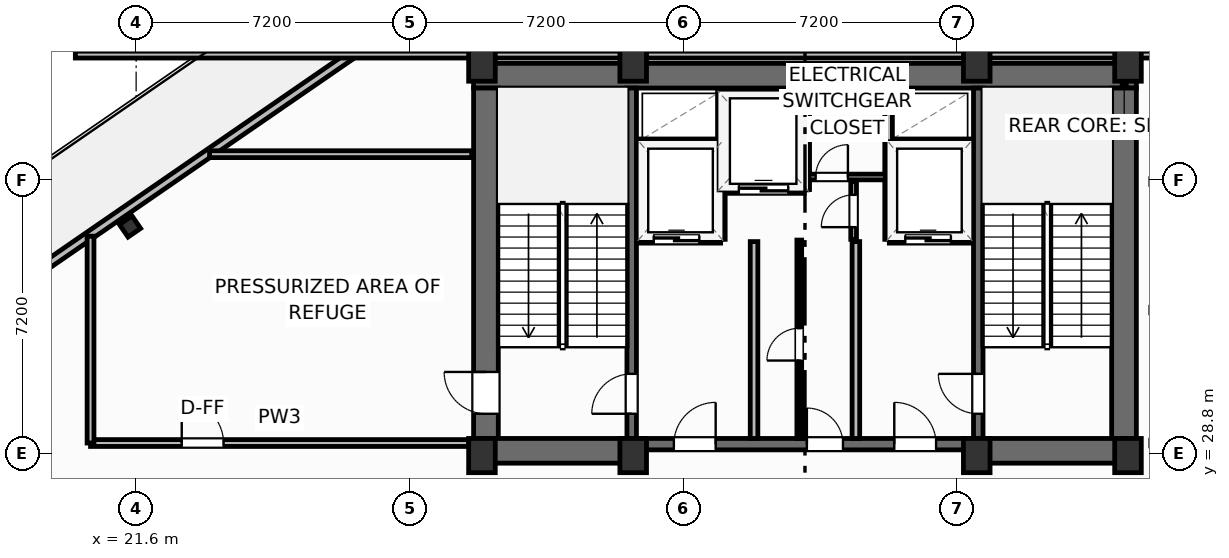
"""IFC4 building model, lengths in metres.
Left out: names, types, materials, properties, quantities, classifications, styles, units other than length and angle.
Written with IfcOpenShell. Run it as: python <this file> out.ifc"""

import sys

from ifc_helpers import new_model, si_unit, direction, frame, frame_2d, origin, origin_2d, place, context, subcontext, project, spatial, rectangle, i_section, extrude, element, fill, save


model = new_model("IFC4")
c1 = context("Model", 3, precision=1e-05, world=origin(), true_north=direction((0.0, 1.0)))
c2 = subcontext(c1, "Body", "Model", "MODEL_VIEW")
j1 = project(units=[si_unit("LENGTHUNIT", "METRE"), si_unit("PLANEANGLEUNIT", "RADIAN")], contexts=[c1])
p1 = place(None, origin())
s1 = spatial("IfcSite", under=j1, at=p1, CompositionType="ELEMENT")
p2 = place(p1, origin())
s2 = spatial("IfcBuilding", under=s1, at=p2, CompositionType="ELEMENT")
p3 = place(p2, frame((0.0, 0.0, 253.4)))
s3 = spatial("IfcBuildingStorey", under=s2, at=p3, CompositionType="ELEMENT", Elevation=253.4)
for number, where, z_axis, x_axis in (
    (1, (30.7, 28.75, 0.0), (0.0, 0.0, 1.0), (1.0, 0.0, 0.0)),
    (2, (34.68, 28.75, 0.0), (0.0, 0.0, 1.0), (1.0, 0.0, 0.0)),
    (3, (43.72, 28.75, 0.0), (0.0, 0.0, 1.0), (1.0, 0.0, 0.0)),
    (4, (47.7, 28.75, 0.0), (0.0, 0.0, 1.0), (1.0, 0.0, 0.0)),
    (5, (30.7, 39.05, 0.0), (0.0, 0.0, 1.0), (1.0, 0.0, 0.0)),
    (6, (34.68, 39.05, 0.0), (0.0, 0.0, 1.0), (1.0, 0.0, 0.0)),
    (7, (43.72, 39.05, 0.0), (0.0, 0.0, 1.0), (1.0, 0.0, 0.0)),
    (8, (47.7, 39.05, 0.0), (0.0, 0.0, 1.0), (1.0, 0.0, 0.0)),
):
    element("IfcColumn", number, at=place(p3, frame(where, z_axis=z_axis, x_axis=x_axis)), inside=s3, PredefinedType="COLUMN", context=c2, shape_type="SweptSolid", body=[
        extrude(rectangle(XDim=0.7, YDim=0.9, at=origin_2d()), origin(), (0.0, 0.0, 1.0), 4.8),
    ])
p4 = place(p3, frame((30.48, 38.745, 0.0), z_axis=(0.0, 0.0, 1.0), x_axis=(1.0, 0.0, 0.0)))
e9 = element("IfcWall", 9, at=p4, inside=s3, PredefinedType="SHEAR", context=c2, shape_type="SweptSolid", body=[
    extrude(rectangle(XDim=17.44, YDim=0.65, at=frame_2d((8.72, 0.0))), origin(), (0.0, 0.0, 1.0), 4.55),
])
p5 = place(p3, frame((30.805, 29.2, 0.0), z_axis=(0.0, 0.0, 1.0), x_axis=(0.0, 1.0, 0.0)))
e10 = element("IfcWall", 10, at=p5, inside=s3, PredefinedType="SHEAR", context=c2, shape_type="SweptSolid", body=[
    extrude(rectangle(XDim=9.22, YDim=0.65, at=frame_2d((4.61, 0.0))), origin(), (0.0, 0.0, 1.0), 4.55),
])
p6 = place(p5, frame((0.65, 0.0, 0.0)))
e11 = element("IfcOpeningElement", 11, at=p6, cuts=e10, PredefinedType="OPENING", context=c2, shape_type="SweptSolid", body=[
    extrude(rectangle(XDim=1.1, YDim=2.15, at=frame_2d((0.55, 1.075))), frame((0.0, 0.335, 0.0), z_axis=(0.0, -1.0, 0.0), x_axis=(1.0, 0.0, 0.0)), (0.0, 0.0, 1.0), 0.67),
])
p7 = place(p3, frame((47.595, 29.2, 0.0), z_axis=(0.0, 0.0, 1.0), x_axis=(0.0, 1.0, 0.0)))
e12 = element("IfcWall", 12, at=p7, inside=s3, PredefinedType="SHEAR", context=c2, shape_type="SweptSolid", body=[
    extrude(rectangle(XDim=9.22, YDim=0.65, at=frame_2d((4.61, 0.0))), origin(), (0.0, 0.0, 1.0), 4.55),
])
p8 = place(p3, frame((30.48, 28.875, 0.0), z_axis=(0.0, 0.0, 1.0), x_axis=(1.0, 0.0, 0.0)))
e13 = element("IfcWall", 13, at=p8, inside=s3, PredefinedType="SHEAR", context=c2, shape_type="SweptSolid", body=[
    extrude(rectangle(XDim=4.32, YDim=0.65, at=frame_2d((2.16, 0.0))), origin(), (0.0, 0.0, 1.0), 4.55),
])
p9 = place(p3, frame((43.6, 28.875, 0.0), z_axis=(0.0, 0.0, 1.0), x_axis=(1.0, 0.0, 0.0)))
e14 = element("IfcWall", 14, at=p9, inside=s3, PredefinedType="SHEAR", context=c2, shape_type="SweptSolid", body=[
    extrude(rectangle(XDim=4.32, YDim=0.65, at=frame_2d((2.16, 0.0))), origin(), (0.0, 0.0, 1.0), 4.55),
])
p10 = place(p3, frame((34.8, 29.05, 0.0), z_axis=(0.0, 0.0, 1.0), x_axis=(1.0, 0.0, 0.0)))
e15 = element("IfcWall", 15, at=p10, inside=s3, PredefinedType="SHEAR", context=c2, shape_type="SweptSolid", body=[
    extrude(rectangle(XDim=8.8, YDim=0.3, at=frame_2d((4.4, 0.0))), origin(), (0.0, 0.0, 1.0), 4.55),
])
p11 = place(p10, frame((0.95, 0.0, 0.0)))
e16 = element("IfcOpeningElement", 16, at=p11, cuts=e15, PredefinedType="OPENING", context=c2, shape_type="SweptSolid", body=[
    extrude(rectangle(XDim=1.1, YDim=2.15, at=frame_2d((0.55, 1.075))), frame((0.0, 0.16, 0.0), z_axis=(0.0, -1.0, 0.0), x_axis=(1.0, 0.0, 0.0)), (0.0, 0.0, 1.0), 0.32),
])
p12 = place(p10, frame((6.75, 0.0, 0.0)))
e17 = element("IfcOpeningElement", 17, at=p12, cuts=e15, PredefinedType="OPENING", context=c2, shape_type="SweptSolid", body=[
    extrude(rectangle(XDim=1.1, YDim=2.15, at=frame_2d((0.55, 1.075))), frame((0.0, 0.16, 0.0), z_axis=(0.0, -1.0, 0.0), x_axis=(1.0, 0.0, 0.0)), (0.0, 0.0, 1.0), 0.32),
])
p13 = place(p10, frame((4.45, 0.0, 0.0)))
e18 = element("IfcOpeningElement", 18, at=p13, cuts=e15, PredefinedType="OPENING", context=c2, shape_type="SweptSolid", body=[
    extrude(rectangle(XDim=0.95, YDim=2.15, at=frame_2d((0.475, 1.075))), frame((0.0, 0.16, 0.0), z_axis=(0.0, -1.0, 0.0), x_axis=(1.0, 0.0, 0.0)), (0.0, 0.0, 1.0), 0.32),
])
p14 = place(p3, frame((34.64, 29.2, 0.0), z_axis=(0.0, 0.0, 1.0), x_axis=(0.0, 1.0, 0.0)))
e19 = element("IfcWall", 19, at=p14, inside=s3, PredefinedType="SHEAR", context=c2, shape_type="SweptSolid", body=[
    extrude(rectangle(XDim=9.22, YDim=0.25, at=frame_2d((4.61, 0.0))), origin(), (0.0, 0.0, 1.0), 4.55),
])
p15 = place(p14, frame((0.65, 0.0, 0.0)))
e20 = element("IfcOpeningElement", 20, at=p15, cuts=e19, PredefinedType="OPENING", context=c2, shape_type="SweptSolid", body=[
    extrude(rectangle(XDim=1.05, YDim=2.15, at=frame_2d((0.525, 1.075))), frame((0.0, 0.135, 0.0), z_axis=(0.0, -1.0, 0.0), x_axis=(1.0, 0.0, 0.0)), (0.0, 0.0, 1.0), 0.27),
])
p16 = place(p3, frame((43.76, 29.2, 0.0), z_axis=(0.0, 0.0, 1.0), x_axis=(0.0, 1.0, 0.0)))
e21 = element("IfcWall", 21, at=p16, inside=s3, PredefinedType="SHEAR", context=c2, shape_type="SweptSolid", body=[
    extrude(rectangle(XDim=9.22, YDim=0.25, at=frame_2d((4.61, 0.0))), origin(), (0.0, 0.0, 1.0), 4.55),
])
p17 = place(p16, frame((0.65, 0.0, 0.0)))
e22 = element("IfcOpeningElement", 22, at=p17, cuts=e21, PredefinedType="OPENING", context=c2, shape_type="SweptSolid", body=[
    extrude(rectangle(XDim=1.05, YDim=2.15, at=frame_2d((0.525, 1.075))), frame((0.0, 0.135, 0.0), z_axis=(0.0, -1.0, 0.0), x_axis=(1.0, 0.0, 0.0)), (0.0, 0.0, 1.0), 0.27),
])
p18 = place(p3, frame((21.44, 34.778, -0.32), z_axis=(0.0, 0.0, 1.0), x_axis=(0.823532597628, 0.567268949127, 0.0)))
e23 = element("IfcColumn", 23, at=p18, inside=s3, PredefinedType="COLUMN", context=c2, shape_type="SweptSolid", body=[
    extrude(i_section(OverallWidth=0.401, OverallDepth=0.399, WebThickness=0.025, FlangeThickness=0.04, FilletRadius=0.022, at=origin_2d()), origin(), (0.0, 0.0, 1.0), 5.12),
])
p19 = place(p3, frame((7.331, 25.557, 0.0), z_axis=(0.0, 0.0, 1.0), x_axis=(0.823530664362, 0.567271755735, 0.0)))
e24 = element("IfcWall", 24, at=p19, inside=s3, PredefinedType="SOLIDWALL", context=c2, shape_type="SweptSolid", body=[
    extrude(rectangle(XDim=52.2, YDim=0.22, at=frame_2d((26.1, 0.0))), origin(), (0.0, 0.0, 1.0), 3.83),
])
p20 = place(p19, frame((28.025, 0.0, 0.0)))
e25 = element("IfcOpeningElement", 25, at=p20, cuts=e24, PredefinedType="OPENING", context=c2, shape_type="SweptSolid", body=[
    extrude(rectangle(XDim=1.85, YDim=2.3, at=frame_2d((0.925, 1.15))), frame((0.0, 0.12, 0.0), z_axis=(0.0, -1.0, 0.0), x_axis=(1.0, 0.0, 0.0)), (0.0, 0.0, 1.0), 0.24),
])
p21 = place(p19, frame((0.55, 0.0, 0.75)))
e26 = element("IfcOpeningElement", 26, at=p21, cuts=e24, PredefinedType="OPENING", context=c2, shape_type="SweptSolid", body=[
    extrude(rectangle(XDim=1.85, YDim=1.75, at=frame_2d((0.925, 0.875))), frame((0.0, 0.12, 0.0), z_axis=(0.0, -1.0, 0.0), x_axis=(1.0, 0.0, 0.0)), (0.0, 0.0, 1.0), 0.24),
])
p22 = place(p19, frame((49.8, 0.0, 0.75)))
e27 = element("IfcOpeningElement", 27, at=p22, cuts=e24, PredefinedType="OPENING", context=c2, shape_type="SweptSolid", body=[
    extrude(rectangle(XDim=1.85, YDim=1.75, at=frame_2d((0.925, 0.875))), frame((0.0, 0.12, 0.0), z_axis=(0.0, -1.0, 0.0), x_axis=(1.0, 0.0, 0.0)), (0.0, 0.0, 1.0), 0.24),
])
p23 = place(p3, frame((20.4, 29.08, 0.0), z_axis=(0.0, 0.0, 1.0), x_axis=(1.0, 0.0, 0.0)))
e28 = element("IfcWall", 28, at=p23, inside=s3, PredefinedType="PARTITIONING", context=c2, shape_type="SweptSolid", body=[
    extrude(rectangle(XDim=9.95, YDim=0.18, at=frame_2d((4.975, 0.0))), origin(), (0.0, 0.0, 1.0), 4.55),
])
p24 = place(p23, frame((2.4, 0.0, 0.0)))
e29 = element("IfcOpeningElement", 29, at=p24, cuts=e28, PredefinedType="OPENING", context=c2, shape_type="SweptSolid", body=[
    extrude(rectangle(XDim=1.1, YDim=2.15, at=frame_2d((0.55, 1.075))), frame((0.0, 0.1, 0.0), z_axis=(0.0, -1.0, 0.0), x_axis=(1.0, 0.0, 0.0)), (0.0, 0.0, 1.0), 0.2),
])
p25 = place(p3, frame((20.4, 29.08, 0.0), z_axis=(0.0, 0.0, 1.0), x_axis=(0.0, 1.0, 0.0)))
e30 = element("IfcWall", 30, at=p25, inside=s3, PredefinedType="PARTITIONING", context=c2, shape_type="SweptSolid", body=[
    extrude(rectangle(XDim=5.443, YDim=0.18, at=frame_2d((2.721, 0.0))), origin(), (0.0, 0.0, 1.0), 4.55),
])
p26 = place(p3, frame((23.531, 36.68, 0.0), z_axis=(0.0, 0.0, 1.0), x_axis=(1.0, 0.0, 0.0)))
e31 = element("IfcWall", 31, at=p26, inside=s3, PredefinedType="PARTITIONING", context=c2, shape_type="SweptSolid", body=[
    extrude(rectangle(XDim=6.898, YDim=0.18, at=frame_2d((3.449, 0.0))), origin(), (0.0, 0.0, 1.0), 4.55),
])
p27 = place(p3, frame((20.0, 39.3, 0.0), z_axis=(0.0, 0.0, 1.0), x_axis=(1.0, 0.0, 0.0)))
e32 = element("IfcWall", 32, at=p27, inside=s3, PredefinedType="PARTITIONING", context=c2, shape_type="SweptSolid", body=[
    extrude(rectangle(XDim=33.3, YDim=0.18, at=frame_2d((16.65, 0.0))), origin(), (0.0, 0.0, 1.0), 3.839),
])
p28 = place(p27, frame((31.1, 0.0, 0.0)))
e33 = element("IfcOpeningElement", 33, at=p28, cuts=e32, PredefinedType="OPENING", context=c2, shape_type="SweptSolid", body=[
    extrude(rectangle(XDim=1.0, YDim=2.05, at=frame_2d((0.5, 1.025))), frame((0.0, 0.1, 0.0), z_axis=(0.0, -1.0, 0.0), x_axis=(1.0, 0.0, 0.0)), (0.0, 0.0, 1.0), 0.2),
])
for number, where, z_axis, x_axis in (
    (34, (37.86, 29.2, 0.0), (0.0, 0.0, 1.0), (0.0, 1.0, 0.0)),
    (35, (40.54, 29.2, 0.0), (0.0, 0.0, 1.0), (0.0, 1.0, 0.0)),
):
    element("IfcWall", number, at=place(p3, frame(where, z_axis=z_axis, x_axis=x_axis)), inside=s3, PredefinedType="PARTITIONING", context=c2, shape_type="SweptSolid", body=[
        extrude(rectangle(XDim=5.18, YDim=0.2, at=frame_2d((2.59, 0.0))), origin(), (0.0, 0.0, 1.0), 4.55),
    ])
p29 = place(p3, frame((34.8, 34.44, 0.0), z_axis=(0.0, 0.0, 1.0), x_axis=(1.0, 0.0, 0.0)))
e36 = element("IfcWall", 36, at=p29, inside=s3, PredefinedType="PARTITIONING", context=c2, shape_type="SweptSolid", body=[
    extrude(rectangle(XDim=2.18, YDim=0.2, at=frame_2d((1.09, 0.0))), origin(), (0.0, 0.0, 1.0), 4.55),
])
p30 = place(p29, frame((0.42, 0.0, 0.0)))
e37 = element("IfcOpeningElement", 37, at=p30, cuts=e36, PredefinedType="OPENING", context=c2, shape_type="SweptSolid", body=[
    extrude(rectangle(XDim=1.2, YDim=2.2, at=frame_2d((0.6, 1.1))), frame((0.0, 0.11, 0.0), z_axis=(0.0, -1.0, 0.0), x_axis=(1.0, 0.0, 0.0)), (0.0, 0.0, 1.0), 0.22),
])
p31 = place(p3, frame((34.8, 36.98, 0.0), z_axis=(0.0, 0.0, 1.0), x_axis=(1.0, 0.0, 0.0)))
e38 = element("IfcWall", 38, at=p31, inside=s3, PredefinedType="PARTITIONING", context=c2, shape_type="SweptSolid", body=[
    extrude(rectangle(XDim=2.18, YDim=0.2, at=frame_2d((1.09, 0.0))), origin(), (0.0, 0.0, 1.0), 4.55),
])
p32 = place(p3, frame((37.0, 34.44, 0.0), z_axis=(0.0, 0.0, 1.0), x_axis=(0.0, 1.0, 0.0)))
e39 = element("IfcWall", 39, at=p32, inside=s3, PredefinedType="PARTITIONING", context=c2, shape_type="SweptSolid", body=[
    extrude(rectangle(XDim=3.9, YDim=0.2, at=frame_2d((1.95, 0.0))), origin(), (0.0, 0.0, 1.0), 4.55),
])
p33 = place(p3, frame((41.42, 34.44, 0.0), z_axis=(0.0, 0.0, 1.0), x_axis=(1.0, 0.0, 0.0)))
e40 = element("IfcWall", 40, at=p33, inside=s3, PredefinedType="PARTITIONING", context=c2, shape_type="SweptSolid", body=[
    extrude(rectangle(XDim=2.18, YDim=0.2, at=frame_2d((1.09, 0.0))), origin(), (0.0, 0.0, 1.0), 4.55),
])
p34 = place(p33, frame((0.42, 0.0, 0.0)))
e41 = element("IfcOpeningElement", 41, at=p34, cuts=e40, PredefinedType="OPENING", context=c2, shape_type="SweptSolid", body=[
    extrude(rectangle(XDim=1.2, YDim=2.2, at=frame_2d((0.6, 1.1))), frame((0.0, 0.11, 0.0), z_axis=(0.0, -1.0, 0.0), x_axis=(1.0, 0.0, 0.0)), (0.0, 0.0, 1.0), 0.22),
])
p35 = place(p3, frame((41.42, 36.98, 0.0), z_axis=(0.0, 0.0, 1.0), x_axis=(1.0, 0.0, 0.0)))
e42 = element("IfcWall", 42, at=p35, inside=s3, PredefinedType="PARTITIONING", context=c2, shape_type="SweptSolid", body=[
    extrude(rectangle(XDim=2.18, YDim=0.2, at=frame_2d((1.09, 0.0))), origin(), (0.0, 0.0, 1.0), 4.55),
])
p36 = place(p3, frame((41.4, 34.44, 0.0), z_axis=(0.0, 0.0, 1.0), x_axis=(0.0, 1.0, 0.0)))
e43 = element("IfcWall", 43, at=p36, inside=s3, PredefinedType="PARTITIONING", context=c2, shape_type="SweptSolid", body=[
    extrude(rectangle(XDim=3.9, YDim=0.2, at=frame_2d((1.95, 0.0))), origin(), (0.0, 0.0, 1.0), 4.55),
])
p37 = place(p3, frame((37.06, 35.75, 0.0), z_axis=(0.0, 0.0, 1.0), x_axis=(1.0, 0.0, 0.0)))
e44 = element("IfcWall", 44, at=p37, inside=s3, PredefinedType="PARTITIONING", context=c2, shape_type="SweptSolid", body=[
    extrude(rectangle(XDim=2.12, YDim=0.2, at=frame_2d((1.06, 0.0))), origin(), (0.0, 0.0, 1.0), 4.55),
])
p38 = place(p37, frame((0.4, 0.0, 0.0)))
e45 = element("IfcOpeningElement", 45, at=p38, cuts=e44, PredefinedType="OPENING", context=c2, shape_type="SweptSolid", body=[
    extrude(rectangle(XDim=1.3, YDim=2.2, at=frame_2d((0.65, 1.1))), frame((0.0, 0.11, 0.0), z_axis=(0.0, -1.0, 0.0), x_axis=(1.0, 0.0, 0.0)), (0.0, 0.0, 1.0), 0.22),
])
p39 = place(p3, frame((39.22, 35.75, 0.0), z_axis=(0.0, 0.0, 1.0), x_axis=(0.0, 1.0, 0.0)))
e46 = element("IfcWall", 46, at=p39, inside=s3, PredefinedType="PARTITIONING", context=c2, shape_type="SweptSolid", body=[
    extrude(rectangle(XDim=2.59, YDim=0.2, at=frame_2d((1.295, 0.0))), origin(), (0.0, 0.0, 1.0), 4.55),
])
p40 = place(p3, frame((39.3, 36.08, 0.0), z_axis=(0.0, 0.0, 1.0), x_axis=(1.0, 0.0, 0.0)))
e47 = element("IfcWall", 47, at=p40, inside=s3, PredefinedType="PARTITIONING", context=c2, shape_type="SweptSolid", body=[
    extrude(rectangle(XDim=2.02, YDim=0.15, at=frame_2d((1.01, 0.0))), origin(), (0.0, 0.0, 1.0), 4.55),
])
p41 = place(p40, frame((0.18, 0.0, 0.0)))
e48 = element("IfcOpeningElement", 48, at=p41, cuts=e47, PredefinedType="OPENING", context=c2, shape_type="SweptSolid", body=[
    extrude(rectangle(XDim=0.85, YDim=2.05, at=frame_2d((0.425, 1.025))), frame((0.0, 0.085, 0.0), z_axis=(0.0, -1.0, 0.0), x_axis=(1.0, 0.0, 0.0)), (0.0, 0.0, 1.0), 0.17),
])
p42 = place(p3, frame((40.48, 34.44, 0.0), z_axis=(0.0, 0.0, 1.0), x_axis=(0.0, 1.0, 0.0)))
e49 = element("IfcWall", 49, at=p42, inside=s3, PredefinedType="PARTITIONING", context=c2, shape_type="SweptSolid", body=[
    extrude(rectangle(XDim=1.52, YDim=0.15, at=frame_2d((0.76, 0.0))), origin(), (0.0, 0.0, 1.0), 4.55),
])
p43 = place(p42, frame((0.32, 0.0, 0.0)))
e50 = element("IfcOpeningElement", 50, at=p43, cuts=e49, PredefinedType="OPENING", context=c2, shape_type="SweptSolid", body=[
    extrude(rectangle(XDim=0.85, YDim=2.05, at=frame_2d((0.425, 1.025))), frame((0.0, 0.085, 0.0), z_axis=(0.0, -1.0, 0.0), x_axis=(1.0, 0.0, 0.0)), (0.0, 0.0, 1.0), 0.17),
])
p44 = place(p3, frame((39.05, 29.2, 0.0), z_axis=(0.0, 0.0, 1.0), x_axis=(0.0, 1.0, 0.0)))
e51 = element("IfcWall", 51, at=p44, inside=s3, PredefinedType="PARTITIONING", context=c2, shape_type="SweptSolid", body=[
    extrude(rectangle(XDim=5.22, YDim=0.125, at=frame_2d((2.61, 0.0))), origin(), (0.0, 0.0, 1.0), 4.55),
])
p45 = place(p44, frame((2.05, 0.0, 0.0)))
e52 = element("IfcOpeningElement", 52, at=p45, cuts=e51, PredefinedType="OPENING", context=c2, shape_type="SweptSolid", body=[
    extrude(rectangle(XDim=0.85, YDim=2.05, at=frame_2d((0.425, 1.025))), frame((0.0, 0.073, 0.0), z_axis=(0.0, -1.0, 0.0), x_axis=(1.0, 0.0, 0.0)), (0.0, 0.0, 1.0), 0.145),
])
p46 = place(p6, origin())
e53 = element("IfcDoor", 53, at=p46, inside=s3, OperationType="SINGLE_SWING_RIGHT", PredefinedType="DOOR", context=c2, shape_type="SweptSolid", body=[
    extrude(rectangle(XDim=1.1, YDim=2.15, at=frame_2d((0.55, 1.075))), frame((0.0, 0.025, 0.0), z_axis=(0.0, -1.0, 0.0), x_axis=(1.0, 0.0, 0.0)), (0.0, 0.0, 1.0), 0.05),
])
fill(e11, e53)
p47 = place(p24, origin())
e54 = element("IfcDoor", 54, at=p47, inside=s3, OperationType="SINGLE_SWING_LEFT", PredefinedType="DOOR", context=c2, shape_type="SweptSolid", body=[
    extrude(rectangle(XDim=1.1, YDim=2.15, at=frame_2d((0.55, 1.075))), frame((0.0, 0.025, 0.0), z_axis=(0.0, -1.0, 0.0), x_axis=(1.0, 0.0, 0.0)), (0.0, 0.0, 1.0), 0.05),
])
fill(e29, e54)
p48 = place(p15, origin())
e55 = element("IfcDoor", 55, at=p48, inside=s3, OperationType="SINGLE_SWING_LEFT", PredefinedType="DOOR", context=c2, shape_type="SweptSolid", body=[
    extrude(rectangle(XDim=1.05, YDim=2.15, at=frame_2d((0.525, 1.075))), frame((0.0, 0.025, 0.0), z_axis=(0.0, -1.0, 0.0), x_axis=(1.0, 0.0, 0.0)), (0.0, 0.0, 1.0), 0.05),
])
fill(e20, e55)
p49 = place(p17, origin())
e56 = element("IfcDoor", 56, at=p49, inside=s3, OperationType="SINGLE_SWING_RIGHT", PredefinedType="DOOR", context=c2, shape_type="SweptSolid", body=[
    extrude(rectangle(XDim=1.05, YDim=2.15, at=frame_2d((0.525, 1.075))), frame((0.0, 0.025, 0.0), z_axis=(0.0, -1.0, 0.0), x_axis=(1.0, 0.0, 0.0)), (0.0, 0.0, 1.0), 0.05),
])
fill(e22, e56)
p50 = place(p11, origin())
e57 = element("IfcDoor", 57, at=p50, inside=s3, OperationType="SINGLE_SWING_RIGHT", PredefinedType="DOOR", context=c2, shape_type="SweptSolid", body=[
    extrude(rectangle(XDim=1.1, YDim=2.15, at=frame_2d((0.55, 1.075))), frame((0.0, 0.025, 0.0), z_axis=(0.0, -1.0, 0.0), x_axis=(1.0, 0.0, 0.0)), (0.0, 0.0, 1.0), 0.05),
])
fill(e16, e57)
p51 = place(p12, origin())
e58 = element("IfcDoor", 58, at=p51, inside=s3, OperationType="SINGLE_SWING_LEFT", PredefinedType="DOOR", context=c2, shape_type="SweptSolid", body=[
    extrude(rectangle(XDim=1.1, YDim=2.15, at=frame_2d((0.55, 1.075))), frame((0.0, 0.025, 0.0), z_axis=(0.0, -1.0, 0.0), x_axis=(1.0, 0.0, 0.0)), (0.0, 0.0, 1.0), 0.05),
])
fill(e17, e58)
p52 = place(p30, origin())
e59 = element("IfcDoor", 59, at=p52, inside=s3, OperationType="SLIDING_TO_LEFT", PredefinedType="DOOR", context=c2, shape_type="SweptSolid", body=[
    extrude(rectangle(XDim=1.2, YDim=2.2, at=frame_2d((0.6, 1.1))), frame((0.0, 0.025, 0.0), z_axis=(0.0, -1.0, 0.0), x_axis=(1.0, 0.0, 0.0)), (0.0, 0.0, 1.0), 0.05),
])
fill(e37, e59)
p53 = place(p34, origin())
e60 = element("IfcDoor", 60, at=p53, inside=s3, OperationType="SLIDING_TO_LEFT", PredefinedType="DOOR", context=c2, shape_type="SweptSolid", body=[
    extrude(rectangle(XDim=1.2, YDim=2.2, at=frame_2d((0.6, 1.1))), frame((0.0, 0.025, 0.0), z_axis=(0.0, -1.0, 0.0), x_axis=(1.0, 0.0, 0.0)), (0.0, 0.0, 1.0), 0.05),
])
fill(e41, e60)
p54 = place(p38, origin())
e61 = element("IfcDoor", 61, at=p54, inside=s3, OperationType="SLIDING_TO_LEFT", PredefinedType="DOOR", context=c2, shape_type="SweptSolid", body=[
    extrude(rectangle(XDim=1.3, YDim=2.2, at=frame_2d((0.65, 1.1))), frame((0.0, 0.025, 0.0), z_axis=(0.0, -1.0, 0.0), x_axis=(1.0, 0.0, 0.0)), (0.0, 0.0, 1.0), 0.05),
])
fill(e45, e61)
p55 = place(p41, origin())
e62 = element("IfcDoor", 62, at=p55, inside=s3, OperationType="SINGLE_SWING_RIGHT", PredefinedType="DOOR", context=c2, shape_type="SweptSolid", body=[
    extrude(rectangle(XDim=0.85, YDim=2.05, at=frame_2d((0.425, 1.025))), frame((0.0, 0.025, 0.0), z_axis=(0.0, -1.0, 0.0), x_axis=(1.0, 0.0, 0.0)), (0.0, 0.0, 1.0), 0.05),
])
fill(e48, e62)
p56 = place(p43, origin())
e63 = element("IfcDoor", 63, at=p56, inside=s3, OperationType="SINGLE_SWING_LEFT", PredefinedType="DOOR", context=c2, shape_type="SweptSolid", body=[
    extrude(rectangle(XDim=0.85, YDim=2.05, at=frame_2d((0.425, 1.025))), frame((0.0, 0.025, 0.0), z_axis=(0.0, -1.0, 0.0), x_axis=(1.0, 0.0, 0.0)), (0.0, 0.0, 1.0), 0.05),
])
fill(e50, e63)
p57 = place(p45, origin())
e64 = element("IfcDoor", 64, at=p57, inside=s3, OperationType="SINGLE_SWING_LEFT", PredefinedType="DOOR", context=c2, shape_type="SweptSolid", body=[
    extrude(rectangle(XDim=0.85, YDim=2.05, at=frame_2d((0.425, 1.025))), frame((0.0, 0.025, 0.0), z_axis=(0.0, -1.0, 0.0), x_axis=(1.0, 0.0, 0.0)), (0.0, 0.0, 1.0), 0.05),
])
fill(e52, e64)
p58 = place(p13, origin())
e65 = element("IfcDoor", 65, at=p58, inside=s3, OperationType="SINGLE_SWING_LEFT", PredefinedType="DOOR", context=c2, shape_type="SweptSolid", body=[
    extrude(rectangle(XDim=0.95, YDim=2.15, at=frame_2d((0.475, 1.075))), frame((0.0, 0.025, 0.0), z_axis=(0.0, -1.0, 0.0), x_axis=(1.0, 0.0, 0.0)), (0.0, 0.0, 1.0), 0.05),
])
fill(e18, e65)
save(model, sys.argv[1])
